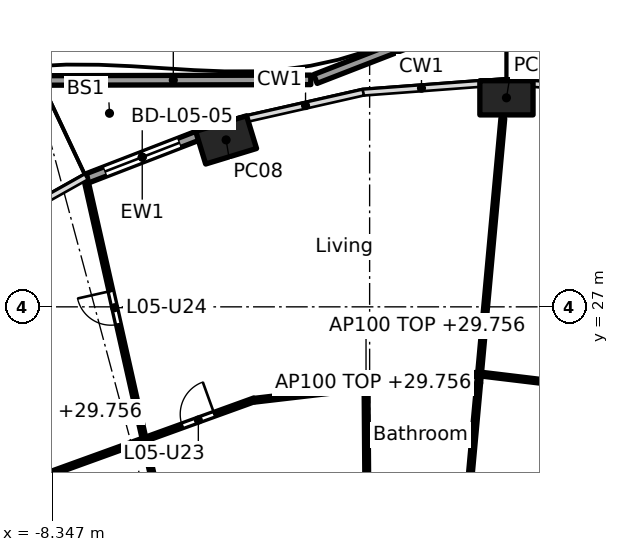
"""IFC4 building model, lengths in metres.
Left out: names, types, materials, properties, quantities, classifications, styles, units other than length and angle.
Written with IfcOpenShell. Run it as: python <this file> out.ifc"""

import sys

from ifc_helpers import new_model, si_unit, direction, frame, frame_2d, origin, origin_2d, place, context, subcontext, project, spatial, rectangle, hollow_rectangle, extrude, element, fill, save


model = new_model("IFC4")
c1 = context("Model", 3, precision=1e-05, world=origin(), true_north=direction((0.0, 1.0)))
c2 = subcontext(c1, "Body", "Model", "MODEL_VIEW")
j1 = project(units=[si_unit("LENGTHUNIT", "METRE"), si_unit("PLANEANGLEUNIT", "RADIAN")], contexts=[c1])
p1 = place(None, origin())
s1 = spatial("IfcSite", under=j1, at=p1, CompositionType="ELEMENT")
p2 = place(p1, origin())
s2 = spatial("IfcBuilding", under=s1, at=p2, CompositionType="ELEMENT")
p3 = place(p2, frame((0.0, 0.0, 27.0)))
s3 = spatial("IfcBuildingStorey", under=s2, at=p3, CompositionType="ELEMENT", Elevation=27.0)
for number, where, z_axis, x_axis in (
    (1, (3.6, 32.5, 0.0), (0.0, 0.0, 1.0), (-1.0, 0.0, 0.0)),
    (2, (-3.776, 31.393, 0.0), (0.0, 0.0, 1.0), (-0.957, -0.292, 0.0)),
):
    element("IfcColumn", number, at=place(p3, frame(where, z_axis=z_axis, x_axis=x_axis)), inside=s3, PredefinedType="COLUMN", context=c2, shape_type="SweptSolid", body=[
        extrude(hollow_rectangle(XDim=1.4, YDim=0.9, WallThickness=0.05, at=origin_2d()), origin(), (0.0, 0.0, 1.0), 3.7),
    ])
p4 = place(p3, frame((-7.453, 30.371, 0.0), z_axis=(0.0, 0.0, 1.0), x_axis=(0.932809381943, 0.360370166577, 0.0)))
e3 = element("IfcWall", 3, at=p4, inside=s3, PredefinedType="SOLIDWALL", context=c2, shape_type="SweptSolid", body=[
    extrude(rectangle(XDim=3.151, YDim=0.25, at=frame_2d((1.575, 0.0))), origin(), (0.0, 0.0, 1.0), 3.44),
])
p5 = place(p4, frame((0.525, 0.0, 0.0)))
e4 = element("IfcOpeningElement", 4, at=p5, cuts=e3, PredefinedType="OPENING", context=c2, shape_type="SweptSolid", body=[
    extrude(rectangle(XDim=2.1, YDim=2.4, at=frame_2d((1.05, 1.2))), frame((0.0, 0.135, 0.0), z_axis=(0.0, -1.0, 0.0), x_axis=(1.0, 0.0, 0.0)), (0.0, 0.0, 1.0), 0.27),
])
p6 = place(p3, frame((3.713, 34.99, 0.0), z_axis=(0.0, 0.0, 1.0), x_axis=(-0.932281162563, -0.361734479874, 0.0)))
e5 = element("IfcWall", 5, at=p6, inside=s3, PredefinedType="PARAPET", context=c2, shape_type="SweptSolid", body=[
    extrude(rectangle(XDim=5.513, YDim=0.25, at=frame_2d((2.756, 0.0))), origin(), (0.0, 0.0, 1.0), 1.1),
])
p7 = place(p3, frame((-1.549, 32.972, 0.0), z_axis=(0.0, 0.0, 1.0), x_axis=(-0.999997519695, -0.002227241126, 0.0)))
e6 = element("IfcWall", 6, at=p7, inside=s3, PredefinedType="PARAPET", context=c2, shape_type="SweptSolid", body=[
    extrude(rectangle(XDim=7.235, YDim=0.25, at=frame_2d((3.617, 0.0))), origin(), (0.0, 0.0, 1.0), 1.1),
])
p8 = place(p3, frame((8.858, 24.516, 0.0), z_axis=(0.0, 0.0, 1.0), x_axis=(-0.992834127896, 0.119500604542, 0.0)))
e7 = element("IfcWall", 7, at=p8, inside=s3, PredefinedType="PARTITIONING", context=c2, shape_type="SweptSolid", body=[
    extrude(rectangle(XDim=5.959, YDim=0.1, at=frame_2d((2.98, 0.0))), origin(), (0.0, 0.0, 1.0), 2.756),
])
p9 = place(p8, frame((2.53, 0.0, 0.0)))
e8 = element("IfcOpeningElement", 8, at=p9, cuts=e7, PredefinedType="OPENING", context=c2, shape_type="SweptSolid", body=[
    extrude(rectangle(XDim=0.9, YDim=2.1, at=frame_2d((0.45, 1.05))), frame((0.0, 0.06, 0.0), z_axis=(0.0, -1.0, 0.0), x_axis=(1.0, 0.0, 0.0)), (0.0, 0.0, 1.0), 0.12),
])
p10 = place(p3, frame((2.234, 18.032, 0.0), z_axis=(0.0, 0.0, 1.0), x_axis=(0.090891502968, 0.995860800859, 0.0)))
e9 = element("IfcWall", 9, at=p10, inside=s3, PredefinedType="PARTITIONING", context=c2, shape_type="SweptSolid", body=[
    extrude(rectangle(XDim=13.984, YDim=0.1, at=frame_2d((6.992, 0.0))), origin(), (0.0, 0.0, 1.0), 2.756),
])
p11 = place(p3, frame((2.842, 25.229, 0.0), z_axis=(0.0, 0.0, 1.0), x_axis=(-0.993255612046, -0.115945198862, 0.0)))
e10 = element("IfcWall", 10, at=p11, inside=s3, PredefinedType="PARTITIONING", context=c2, shape_type="SweptSolid", body=[
    extrude(rectangle(XDim=5.913, YDim=0.1, at=frame_2d((2.956, 0.0))), origin(), (0.0, 0.0, 1.0), 2.756),
])
p12 = place(p3, frame((-0.001, 12.665, 0.0), z_axis=(0.0, 0.0, 1.0), x_axis=(-0.007702417287, 0.999970335944, 0.0)))
e11 = element("IfcWall", 11, at=p12, inside=s3, PredefinedType="PARTITIONING", context=c2, shape_type="SweptSolid", body=[
    extrude(rectangle(XDim=12.171, YDim=0.1, at=frame_2d((6.086, 0.0))), origin(), (0.0, 0.0, 1.0), 2.687),
])
p13 = place(p12, frame((2.183, 0.0, 0.0)))
e12 = element("IfcOpeningElement", 12, at=p13, cuts=e11, PredefinedType="OPENING", context=c2, shape_type="SweptSolid", body=[
    extrude(rectangle(XDim=0.9, YDim=2.1, at=frame_2d((0.45, 1.05))), frame((0.0, 0.06, 0.0), z_axis=(0.0, -1.0, 0.0), x_axis=(1.0, 0.0, 0.0)), (0.0, 0.0, 1.0), 0.12),
])
p14 = place(p12, frame((8.269, 0.0, 0.0)))
e13 = element("IfcOpeningElement", 13, at=p14, cuts=e11, PredefinedType="OPENING", context=c2, shape_type="SweptSolid", body=[
    extrude(rectangle(XDim=0.9, YDim=2.1, at=frame_2d((0.45, 1.05))), frame((0.0, 0.06, 0.0), z_axis=(0.0, -1.0, 0.0), x_axis=(1.0, 0.0, 0.0)), (0.0, 0.0, 1.0), 0.12),
])
p15 = place(p3, frame((-3.034, 24.554, 0.0), z_axis=(0.0, 0.0, 1.0), x_axis=(-0.940401691072, -0.340065669288, 0.0)))
e14 = element("IfcWall", 14, at=p15, inside=s3, PredefinedType="PARTITIONING", context=c2, shape_type="SweptSolid", body=[
    extrude(rectangle(XDim=6.067, YDim=0.1, at=frame_2d((3.034, 0.0))), origin(), (0.0, 0.0, 1.0), 2.756),
])
p16 = place(p15, frame((1.117, 0.0, 0.0)))
e15 = element("IfcOpeningElement", 15, at=p16, cuts=e14, PredefinedType="OPENING", context=c2, shape_type="SweptSolid", body=[
    extrude(rectangle(XDim=0.9, YDim=2.1, at=frame_2d((0.45, 1.05))), frame((0.0, 0.06, 0.0), z_axis=(0.0, -1.0, 0.0), x_axis=(1.0, 0.0, 0.0)), (0.0, 0.0, 1.0), 0.12),
])
p17 = place(p3, frame((-3.492, 12.662, 0.0), z_axis=(0.0, 0.0, 1.0), x_axis=(-0.219268088006, 0.975664648115, 0.0)))
e16 = element("IfcWall", 16, at=p17, inside=s3, PredefinedType="PARTITIONING", context=c2, shape_type="SweptSolid", body=[
    extrude(rectangle(XDim=18.23, YDim=0.1, at=frame_2d((9.115, 0.0))), origin(), (0.0, 0.0, 1.0), 2.687),
])
p18 = place(p17, frame((0.35, 0.0, 0.0)))
e17 = element("IfcOpeningElement", 17, at=p18, cuts=e16, PredefinedType="OPENING", context=c2, shape_type="SweptSolid", body=[
    extrude(rectangle(XDim=0.9, YDim=2.1, at=frame_2d((0.45, 1.05))), frame((0.0, 0.06, 0.0), z_axis=(0.0, -1.0, 0.0), x_axis=(1.0, 0.0, 0.0)), (0.0, 0.0, 1.0), 0.12),
])
p19 = place(p17, frame((7.497, 0.0, 0.0)))
e18 = element("IfcOpeningElement", 18, at=p19, cuts=e16, PredefinedType="OPENING", context=c2, shape_type="SweptSolid", body=[
    extrude(rectangle(XDim=0.9, YDim=2.1, at=frame_2d((0.45, 1.05))), frame((0.0, 0.06, 0.0), z_axis=(0.0, -1.0, 0.0), x_axis=(1.0, 0.0, 0.0)), (0.0, 0.0, 1.0), 0.12),
])
p20 = place(p17, frame((14.223, 0.0, 0.0)))
e19 = element("IfcOpeningElement", 19, at=p20, cuts=e16, PredefinedType="OPENING", context=c2, shape_type="SweptSolid", body=[
    extrude(rectangle(XDim=0.9, YDim=2.1, at=frame_2d((0.45, 1.05))), frame((0.0, 0.06, 0.0), z_axis=(0.0, -1.0, 0.0), x_axis=(1.0, 0.0, 0.0)), (0.0, 0.0, 1.0), 0.12),
])
p21 = place(p5, origin())
e20 = element("IfcDoor", 20, at=p21, inside=s3, OperationType="SLIDING_TO_LEFT", PredefinedType="DOOR", context=c2, shape_type="SweptSolid", body=[
    extrude(rectangle(XDim=2.1, YDim=2.4, at=frame_2d((1.05, 1.2))), frame((0.0, 0.025, 0.0), z_axis=(0.0, -1.0, 0.0), x_axis=(1.0, 0.0, 0.0)), (0.0, 0.0, 1.0), 0.05),
])
fill(e4, e20)
p22 = place(p16, frame((0.9, 0.0, 0.0), x_axis=(-1.0, 0.0, 0.0)))
e21 = element("IfcDoor", 21, at=p22, inside=s3, OperationType="SINGLE_SWING_RIGHT", PredefinedType="DOOR", context=c2, shape_type="SweptSolid", body=[
    extrude(rectangle(XDim=0.9, YDim=2.1, at=frame_2d((0.45, 1.05))), frame((0.0, 0.025, 0.0), z_axis=(0.0, -1.0, 0.0), x_axis=(1.0, 0.0, 0.0)), (0.0, 0.0, 1.0), 0.05),
])
fill(e15, e21)
p23 = place(p20, origin())
e22 = element("IfcDoor", 22, at=p23, inside=s3, OperationType="SINGLE_SWING_RIGHT", PredefinedType="DOOR", context=c2, shape_type="SweptSolid", body=[
    extrude(rectangle(XDim=0.9, YDim=2.1, at=frame_2d((0.45, 1.05))), frame((0.0, 0.025, 0.0), z_axis=(0.0, -1.0, 0.0), x_axis=(1.0, 0.0, 0.0)), (0.0, 0.0, 1.0), 0.05),
])
fill(e19, e22)
save(model, sys.argv[1])
